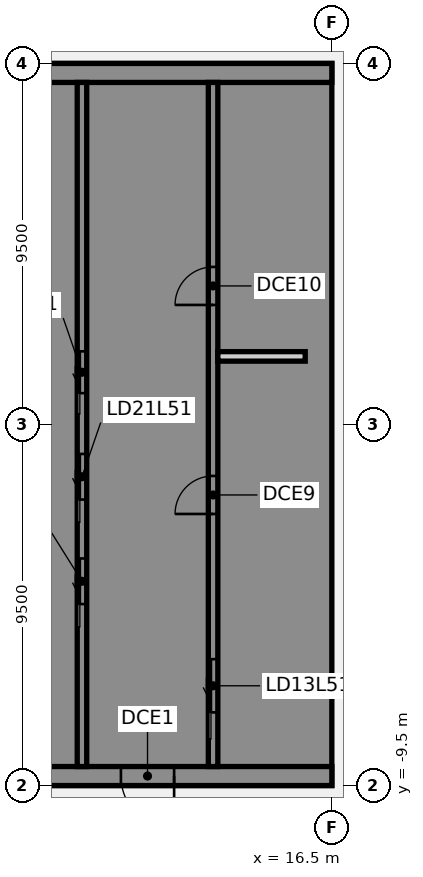
"""IFC4 building model, lengths in metres.
Left out: names, types, materials, properties, quantities, classifications, styles, units other than length and angle.
Written with IfcOpenShell. Run it as: python <this file> out.ifc"""

import sys

from ifc_helpers import new_model, si_unit, direction, frame, frame_2d, origin, place, context, subcontext, project, spatial, polyline, rectangle, outline, extrude, element, fill, save


model = new_model("IFC4")
c1 = context("Model", 3, precision=1e-05, world=origin(), true_north=direction((0.0, 1.0)))
c2 = subcontext(c1, "Body", "Model", "MODEL_VIEW")
j1 = project(units=[si_unit("LENGTHUNIT", "METRE"), si_unit("PLANEANGLEUNIT", "RADIAN")], contexts=[c1])
p1 = place(None, origin())
s1 = spatial("IfcSite", under=j1, at=p1, CompositionType="ELEMENT")
p2 = place(p1, origin())
s2 = spatial("IfcBuilding", under=s1, at=p2, CompositionType="ELEMENT")
p3 = place(p2, frame((0.0, 0.0, 204.1)))
s3 = spatial("IfcBuildingStorey", under=s2, at=p3, CompositionType="ELEMENT", Elevation=204.1)
p4 = place(p3, frame((16.5, -9.25, 0.0), z_axis=(0.0, 0.0, 1.0), x_axis=(-1.0, 0.0, 0.0)))
e1 = element("IfcWall", 1, at=p4, inside=s3, PredefinedType="SHEAR", context=c2, shape_type="SweptSolid", body=[
    extrude(rectangle(XDim=13.0, YDim=0.5, at=frame_2d((6.5, 0.0))), origin(), (0.0, 0.0, 1.0), 3.46),
])
p5 = place(p4, frame((4.15, 0.0, 0.0)))
e2 = element("IfcOpeningElement", 2, at=p5, cuts=e1, PredefinedType="OPENING", context=c2, shape_type="SweptSolid", body=[
    extrude(rectangle(XDim=1.4, YDim=2.1, at=frame_2d((0.7, 1.05))), frame((0.0, 0.26, 0.0), z_axis=(0.0, -1.0, 0.0), x_axis=(1.0, 0.0, 0.0)), (0.0, 0.0, 1.0), 0.52),
])
p6 = place(p4, frame((10.125, 0.0, 0.0)))
e3 = element("IfcOpeningElement", 3, at=p6, cuts=e1, PredefinedType="OPENING", context=c2, shape_type="SweptSolid", body=[
    extrude(rectangle(XDim=1.4, YDim=2.1, at=frame_2d((0.7, 1.05))), frame((0.0, 0.26, 0.0), z_axis=(0.0, -1.0, 0.0), x_axis=(1.0, 0.0, 0.0)), (0.0, 0.0, 1.0), 0.52),
])
p7 = place(p3, origin())
e4 = element("IfcWall", 4, at=p7, inside=s3, PredefinedType="SHEAR", context=c2, shape_type="SweptSolid", body=[
    extrude(outline(polyline([(13.5, -8.125), (13.5, -9.0), (16.0, -9.0), (16.5, -9.0), (16.5, 9.0), (16.0, 9.0), (13.5, 9.0), (13.5, 8.125), (16.0, 8.125), (16.0, 5.625), (13.5, 5.625), (13.5, 5.375), (16.0, 5.375), (16.0, -5.375), (13.5, -5.375), (13.5, -5.625), (16.0, -5.625), (16.0, -8.125), (13.5, -8.125)])), origin(), (0.0, 0.0, 1.0), 3.46),
])
p8 = place(p3, frame((16.5, 9.25, 0.0), z_axis=(0.0, 0.0, 1.0), x_axis=(-1.0, 0.0, 0.0)))
e5 = element("IfcWall", 5, at=p8, inside=s3, PredefinedType="SHEAR", context=c2, shape_type="SweptSolid", body=[
    extrude(rectangle(XDim=13.0, YDim=0.5, at=frame_2d((6.5, 0.0))), origin(), (0.0, 0.0, 1.0), 3.46),
])
p9 = place(p3, origin())
e6 = element("IfcWall", 6, at=p9, inside=s3, PredefinedType="SHEAR", context=c2, shape_type="SweptSolid", body=[
    extrude(outline(polyline([(9.8, -5.375), (7.5, -5.375), (7.5, -2.875), (9.8, -2.875), (9.8, -2.625), (7.5, -2.625), (7.5, -0.125), (9.8, -0.125), (9.8, 0.125), (7.5, 0.125), (7.5, 2.625), (9.8, 2.625), (9.8, 2.875), (7.5, 2.875), (7.5, 5.375), (9.8, 5.375), (9.8, 5.625), (7.5, 5.625), (7.5, 8.125), (9.8, 8.125), (9.8, 9.0), (7.5, 9.0), (7.25, 9.0), (7.25, -5.625), (7.5, -5.625), (9.8, -5.625), (9.8, -5.375)])), origin(), (0.0, 0.0, 1.0), 3.46),
])
p10 = place(p3, origin())
e7 = element("IfcWall", 7, at=p10, inside=s3, PredefinedType="SHEAR", context=c2, shape_type="SweptSolid", body=[
    extrude(outline(polyline([(7.5, -8.125), (7.5, -9.0), (9.8, -9.0), (9.8, -8.125), (9.8, -5.625), (9.55, -5.625), (9.55, -8.125), (7.5, -8.125)])), origin(), (0.0, 0.0, 1.0), 3.46),
])
p11 = place(p3, frame((13.375, -9.0, 0.0), z_axis=(0.0, 0.0, 1.0), x_axis=(0.0, 1.0, 0.0)))
e8 = element("IfcWall", 8, at=p11, inside=s3, PredefinedType="SHEAR", context=c2, shape_type="SweptSolid", body=[
    extrude(rectangle(XDim=18.0, YDim=0.25, at=frame_2d((9.0, 0.0))), origin(), (0.0, 0.0, 1.0), 3.46),
])
p12 = place(p11, frame((1.425, 0.0, 0.0)))
e9 = element("IfcOpeningElement", 9, at=p12, cuts=e8, PredefinedType="OPENING", context=c2, shape_type="SweptSolid", body=[
    extrude(rectangle(XDim=1.4, YDim=2.1, at=frame_2d((0.7, 1.05))), frame((0.0, 0.135, 0.0), z_axis=(0.0, -1.0, 0.0), x_axis=(1.0, 0.0, 0.0)), (0.0, 0.0, 1.0), 0.27),
])
p13 = place(p11, frame((6.646, 0.0, 0.0)))
e10 = element("IfcOpeningElement", 10, at=p13, cuts=e8, PredefinedType="OPENING", context=c2, shape_type="SweptSolid", body=[
    extrude(rectangle(XDim=1.0, YDim=2.1, at=frame_2d((0.5, 1.05))), frame((0.0, 0.135, 0.0), z_axis=(0.0, -1.0, 0.0), x_axis=(1.0, 0.0, 0.0)), (0.0, 0.0, 1.0), 0.27),
])
p14 = place(p11, frame((12.146, 0.0, 0.0)))
e11 = element("IfcOpeningElement", 11, at=p14, cuts=e8, PredefinedType="OPENING", context=c2, shape_type="SweptSolid", body=[
    extrude(rectangle(XDim=1.0, YDim=2.1, at=frame_2d((0.5, 1.05))), frame((0.0, 0.135, 0.0), z_axis=(0.0, -1.0, 0.0), x_axis=(1.0, 0.0, 0.0)), (0.0, 0.0, 1.0), 0.27),
])
p15 = place(p3, frame((9.925, -9.0, 0.0), z_axis=(0.0, 0.0, 1.0), x_axis=(0.0, 1.0, 0.0)))
e12 = element("IfcWall", 12, at=p15, inside=s3, PredefinedType="SHEAR", context=c2, shape_type="SweptSolid", body=[
    extrude(rectangle(XDim=18.0, YDim=0.25, at=frame_2d((9.0, 0.0))), origin(), (0.0, 0.0, 1.0), 3.46),
])
p16 = place(p15, frame((4.275, 0.0, 0.0)))
e13 = element("IfcOpeningElement", 13, at=p16, cuts=e12, PredefinedType="OPENING", context=c2, shape_type="SweptSolid", body=[
    extrude(rectangle(XDim=1.2, YDim=2.1, at=frame_2d((0.6, 1.05))), frame((0.0, 0.135, 0.0), z_axis=(0.0, -1.0, 0.0), x_axis=(1.0, 0.0, 0.0)), (0.0, 0.0, 1.0), 0.27),
])
p17 = place(p15, frame((7.025, 0.0, 0.0)))
e14 = element("IfcOpeningElement", 14, at=p17, cuts=e12, PredefinedType="OPENING", context=c2, shape_type="SweptSolid", body=[
    extrude(rectangle(XDim=1.2, YDim=2.1, at=frame_2d((0.6, 1.05))), frame((0.0, 0.135, 0.0), z_axis=(0.0, -1.0, 0.0), x_axis=(1.0, 0.0, 0.0)), (0.0, 0.0, 1.0), 0.27),
])
p18 = place(p15, frame((9.825, 0.0, 0.0)))
e15 = element("IfcOpeningElement", 15, at=p18, cuts=e12, PredefinedType="OPENING", context=c2, shape_type="SweptSolid", body=[
    extrude(rectangle(XDim=1.1, YDim=2.1, at=frame_2d((0.55, 1.05))), frame((0.0, 0.135, 0.0), z_axis=(0.0, -1.0, 0.0), x_axis=(1.0, 0.0, 0.0)), (0.0, 0.0, 1.0), 0.27),
])
p19 = place(p3, frame((15.8, 1.792, 0.0), z_axis=(0.0, 0.0, 1.0), x_axis=(-1.0, 0.0, 0.0)))
e16 = element("IfcWall", 16, at=p19, inside=s3, PredefinedType="PARTITIONING", context=c2, shape_type="SweptSolid", body=[
    extrude(rectangle(XDim=2.3, YDim=0.25, at=frame_2d((1.15, 0.0))), origin(), (0.0, 0.0, 1.0), 3.46),
])
p20 = place(p5, origin())
e17 = element("IfcDoor", 17, at=p20, inside=s3, OperationType="SINGLE_SWING_LEFT", PredefinedType="DOOR", context=c2, shape_type="SweptSolid", body=[
    extrude(rectangle(XDim=1.4, YDim=2.1, at=frame_2d((0.7, 1.05))), frame((0.0, 0.025, 0.0), z_axis=(0.0, -1.0, 0.0), x_axis=(1.0, 0.0, 0.0)), (0.0, 0.0, 1.0), 0.05),
])
fill(e2, e17)
p21 = place(p12, origin())
e18 = element("IfcDoor", 18, at=p21, inside=s3, OperationType="SLIDING_TO_LEFT", PredefinedType="DOOR", context=c2, shape_type="SweptSolid", body=[
    extrude(rectangle(XDim=1.4, YDim=2.1, at=frame_2d((0.7, 1.05))), frame((0.0, 0.025, 0.0), z_axis=(0.0, -1.0, 0.0), x_axis=(1.0, 0.0, 0.0)), (0.0, 0.0, 1.0), 0.05),
])
fill(e9, e18)
p22 = place(p16, origin())
e19 = element("IfcDoor", 19, at=p22, inside=s3, OperationType="SLIDING_TO_LEFT", PredefinedType="DOOR", context=c2, shape_type="SweptSolid", body=[
    extrude(rectangle(XDim=1.2, YDim=2.1, at=frame_2d((0.6, 1.05))), frame((0.0, 0.025, 0.0), z_axis=(0.0, -1.0, 0.0), x_axis=(1.0, 0.0, 0.0)), (0.0, 0.0, 1.0), 0.05),
])
fill(e13, e19)
p23 = place(p17, origin())
e20 = element("IfcDoor", 20, at=p23, inside=s3, OperationType="SLIDING_TO_LEFT", PredefinedType="DOOR", context=c2, shape_type="SweptSolid", body=[
    extrude(rectangle(XDim=1.2, YDim=2.1, at=frame_2d((0.6, 1.05))), frame((0.0, 0.025, 0.0), z_axis=(0.0, -1.0, 0.0), x_axis=(1.0, 0.0, 0.0)), (0.0, 0.0, 1.0), 0.05),
])
fill(e14, e20)
p24 = place(p18, origin())
e21 = element("IfcDoor", 21, at=p24, inside=s3, OperationType="SLIDING_TO_LEFT", PredefinedType="DOOR", context=c2, shape_type="SweptSolid", body=[
    extrude(rectangle(XDim=1.1, YDim=2.1, at=frame_2d((0.55, 1.05))), frame((0.0, 0.025, 0.0), z_axis=(0.0, -1.0, 0.0), x_axis=(1.0, 0.0, 0.0)), (0.0, 0.0, 1.0), 0.05),
])
fill(e15, e21)
p25 = place(p13, origin())
e22 = element("IfcDoor", 22, at=p25, inside=s3, OperationType="SINGLE_SWING_LEFT", PredefinedType="DOOR", context=c2, shape_type="SweptSolid", body=[
    extrude(rectangle(XDim=1.0, YDim=2.1, at=frame_2d((0.5, 1.05))), frame((0.0, 0.025, 0.0), z_axis=(0.0, -1.0, 0.0), x_axis=(1.0, 0.0, 0.0)), (0.0, 0.0, 1.0), 0.05),
])
fill(e10, e22)
p26 = place(p14, origin())
e23 = element("IfcDoor", 23, at=p26, inside=s3, OperationType="SINGLE_SWING_LEFT", PredefinedType="DOOR", context=c2, shape_type="SweptSolid", body=[
    extrude(rectangle(XDim=1.0, YDim=2.1, at=frame_2d((0.5, 1.05))), frame((0.0, 0.025, 0.0), z_axis=(0.0, -1.0, 0.0), x_axis=(1.0, 0.0, 0.0)), (0.0, 0.0, 1.0), 0.05),
])
fill(e11, e23)
save(model, sys.argv[1])
